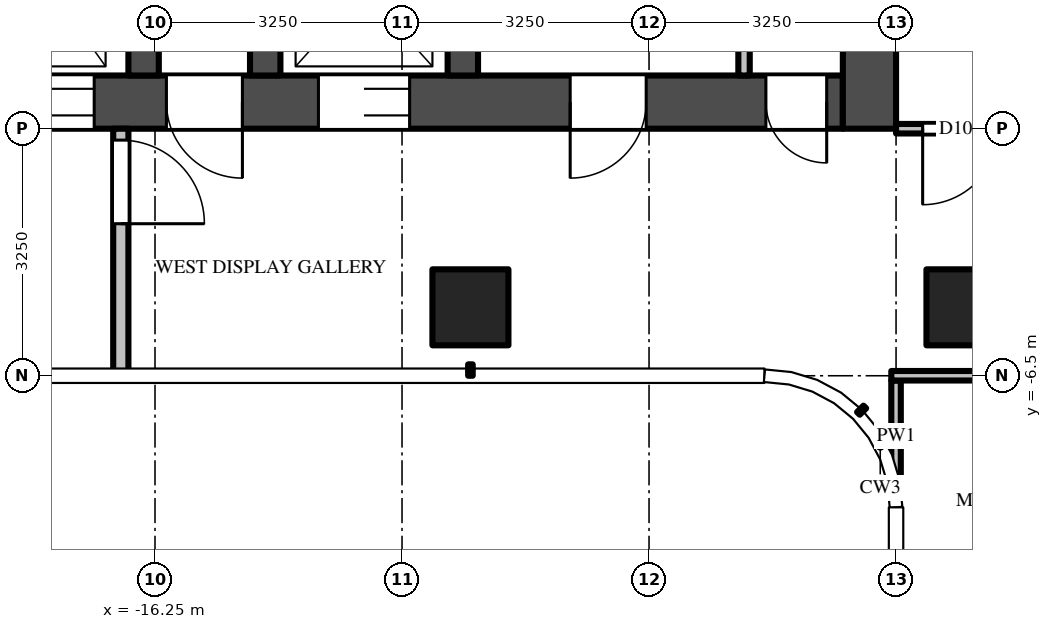
"""IFC4 building model, lengths in metres.
Left out: names, types, materials, properties, quantities, classifications, styles, units other than length and angle.
Written with IfcOpenShell. Run it as: python <this file> out.ifc"""

import sys

from ifc_helpers import new_model, si_unit, direction, frame, frame_2d, origin, origin_2d, place, context, subcontext, project, spatial, rectangle, extrude, source, transform, mapped, element, fill, save


model = new_model("IFC4")
c1 = context("Model", 3, precision=1e-05, world=origin(), true_north=direction((0.0, 1.0)))
c2 = subcontext(c1, "Body", "Model", "MODEL_VIEW")
j1 = project(units=[si_unit("LENGTHUNIT", "METRE"), si_unit("PLANEANGLEUNIT", "RADIAN")], contexts=[c1])
p1 = place(None, origin())
s1 = spatial("IfcSite", under=j1, at=p1, CompositionType="ELEMENT")
p2 = place(p1, origin())
s2 = spatial("IfcBuilding", under=s1, at=p2, CompositionType="ELEMENT")
p3 = place(p2, frame((0.0, 0.0, 279.4)))
s3 = spatial("IfcBuildingStorey", under=s2, at=p3, CompositionType="ELEMENT", Elevation=279.4)
m1 = source(origin(), c2, "Body", "SweptSolid", [
    extrude(rectangle(XDim=1.0, YDim=1.0, at=origin_2d()), origin(), (0.0, 0.0, 1.0), 3.9),
])
for number, where, z_axis, x_axis in (
    (1, (-5.6, -5.6, 0.0), (0.0, 0.0, 1.0), (1.0, 0.0, 0.0)),
    (2, (-12.1, -5.6, 0.0), (0.0, 0.0, 1.0), (1.0, 0.0, 0.0)),
):
    element("IfcColumn", number, at=place(p3, frame(where, z_axis=z_axis, x_axis=x_axis)), inside=s3, PredefinedType="COLUMN", context=c2, shape_type="MappedRepresentation", body=[
        mapped(m1, transform((0.0, 0.0, 0.0))),
    ])
m2 = source(origin(), c2, "Body", "SweptSolid", [
    extrude(rectangle(XDim=14.85, YDim=0.7, at=frame_2d((7.425, 0.0))), origin(), (0.0, 0.0, 1.0), 3.7),
])
p4 = place(p3, frame((-7.2, -2.9, 0.0), z_axis=(0.0, 0.0, 1.0), x_axis=(-1.0, 0.0, 0.0)))
e3 = element("IfcWall", 3, at=p4, inside=s3, PredefinedType="SHEAR", context=c2, shape_type="MappedRepresentation", body=[
    mapped(m2, transform((0.0, 0.0, 0.0))),
])
m3 = source(origin(), c2, "Body", "SweptSolid", [
    extrude(rectangle(XDim=1.2, YDim=2.1, at=frame_2d((0.6, 1.05))), frame((0.0, 0.36, 0.0), z_axis=(0.0, -1.0, 0.0), x_axis=(1.0, 0.0, 0.0)), (0.0, 0.0, 1.0), 0.72),
])
p5 = place(p4, frame((5.7, 0.0, 0.0)))
e4 = element("IfcOpeningElement", 4, at=p5, cuts=e3, PredefinedType="OPENING", context=c2, shape_type="MappedRepresentation", body=[
    mapped(m3, transform((0.0, 0.0, 0.0))),
])
m4 = source(origin(), c2, "Body", "SweptSolid", [
    extrude(rectangle(XDim=1.3, YDim=2.1, at=frame_2d((0.65, 1.05))), frame((0.0, 0.36, 0.0), z_axis=(0.0, -1.0, 0.0), x_axis=(1.0, 0.0, 0.0)), (0.0, 0.0, 1.0), 0.72),
])
p6 = place(p4, frame((12.2, 0.0, 0.0)))
e5 = element("IfcOpeningElement", 5, at=p6, cuts=e3, PredefinedType="OPENING", context=c2, shape_type="MappedRepresentation", body=[
    mapped(m4, transform((0.0, 0.0, 0.0))),
])
p7 = place(p4, frame((9.85, 0.0, 0.0)))
e6 = element("IfcOpeningElement", 6, at=p7, cuts=e3, PredefinedType="OPENING", context=c2, shape_type="MappedRepresentation", body=[
    mapped(m3, transform((0.0, 0.0, 0.0))),
])
m5 = source(origin(), c2, "Body", "SweptSolid", [
    extrude(rectangle(XDim=1.0, YDim=2.1, at=frame_2d((0.5, 1.05))), frame((0.0, 0.36, 0.0), z_axis=(0.0, -1.0, 0.0), x_axis=(1.0, 0.0, 0.0)), (0.0, 0.0, 1.0), 0.72),
])
p8 = place(p4, frame((7.9, 0.0, 0.0)))
e7 = element("IfcOpeningElement", 7, at=p8, cuts=e3, PredefinedType="OPENING", context=c2, shape_type="MappedRepresentation", body=[
    mapped(m5, transform((0.0, 0.0, 0.0))),
])
m6 = source(origin(), c2, "Body", "SweptSolid", [
    extrude(rectangle(XDim=0.8, YDim=2.1, at=frame_2d((0.4, 1.05))), frame((0.0, 0.36, 0.0), z_axis=(0.0, -1.0, 0.0), x_axis=(1.0, 0.0, 0.0)), (0.0, 0.0, 1.0), 0.72),
])
p9 = place(p4, frame((0.212, 0.0, 0.0)))
e8 = element("IfcOpeningElement", 8, at=p9, cuts=e3, PredefinedType="OPENING", context=c2, shape_type="MappedRepresentation", body=[
    mapped(m6, transform((0.0, 0.0, 0.0))),
])
p10 = place(p4, frame((2.587, 0.0, 0.0)))
e9 = element("IfcOpeningElement", 9, at=p10, cuts=e3, PredefinedType="OPENING", context=c2, shape_type="MappedRepresentation", body=[
    mapped(m5, transform((0.0, 0.0, 0.0))),
])
m7 = source(origin(), c2, "Body", "SweptSolid", [
    extrude(rectangle(XDim=9.05, YDim=0.7, at=frame_2d((4.525, 0.0))), origin(), (0.0, 0.0, 1.0), 3.7),
])
p11 = place(p3, frame((-6.85, 5.8, 0.0), z_axis=(0.0, 0.0, 1.0), x_axis=(0.0, -1.0, 0.0)))
e10 = element("IfcWall", 10, at=p11, inside=s3, PredefinedType="SHEAR", context=c2, shape_type="MappedRepresentation", body=[
    mapped(m7, transform((0.0, 0.0, 0.0))),
])
m8 = source(origin(), c2, "Body", "SweptSolid", [
    extrude(rectangle(XDim=1.8, YDim=2.1, at=frame_2d((0.9, 1.05))), frame((0.0, 0.36, 0.0), z_axis=(0.0, -1.0, 0.0), x_axis=(1.0, 0.0, 0.0)), (0.0, 0.0, 1.0), 0.72),
])
p12 = place(p11, frame((3.15, 0.0, 0.0)))
e11 = element("IfcOpeningElement", 11, at=p12, cuts=e10, PredefinedType="OPENING", context=c2, shape_type="MappedRepresentation", body=[
    mapped(m8, transform((0.0, 0.0, 0.0))),
])
m9 = source(origin(), c2, "Body", "SweptSolid", [
    extrude(rectangle(XDim=2.45, YDim=0.4, at=frame_2d((1.225, 0.0))), origin(), (0.0, 0.0, 1.0), 3.7),
])
for number, where, z_axis, x_axis in (
    (12, (-12.2, -0.1, 0.0), (0.0, 0.0, 1.0), (0.0, -1.0, 0.0)),
    (13, (-14.8, -0.1, 0.0), (0.0, 0.0, 1.0), (0.0, -1.0, 0.0)),
    (14, (-16.4, -0.1, 0.0), (0.0, 0.0, 1.0), (0.0, -1.0, 0.0)),
):
    element("IfcWall", number, at=place(p3, frame(where, z_axis=z_axis, x_axis=x_axis)), inside=s3, PredefinedType="SHEAR", context=c2, shape_type="MappedRepresentation", body=[
        mapped(m9, transform((0.0, 0.0, 0.0))),
    ])
m10 = source(origin(), c2, "Body", "SweptSolid", [
    extrude(rectangle(XDim=3.25, YDim=0.2, at=frame_2d((1.625, 0.0))), origin(), (0.0, 0.0, 1.0), 3.7),
])
p13 = place(p3, frame((-16.7, -3.25, 0.0), z_axis=(0.0, 0.0, 1.0), x_axis=(0.0, -1.0, 0.0)))
e15 = element("IfcWall", 15, at=p13, inside=s3, PredefinedType="PARTITIONING", context=c2, shape_type="MappedRepresentation", body=[
    mapped(m10, transform((0.0, 0.0, 0.0))),
])
m11 = source(origin(), c2, "Body", "SweptSolid", [
    extrude(rectangle(XDim=1.1, YDim=2.1, at=frame_2d((0.55, 1.05))), frame((0.0, 0.11, 0.0), z_axis=(0.0, -1.0, 0.0), x_axis=(1.0, 0.0, 0.0)), (0.0, 0.0, 1.0), 0.22),
])
p14 = place(p13, frame((0.15, 0.0, 0.0)))
e16 = element("IfcOpeningElement", 16, at=p14, cuts=e15, PredefinedType="OPENING", context=c2, shape_type="MappedRepresentation", body=[
    mapped(m11, transform((0.0, 0.0, 0.0))),
])
m12 = source(origin(), c2, "Body", "SweptSolid", [
    extrude(rectangle(XDim=2.45, YDim=0.15, at=frame_2d((1.225, 0.0))), origin(), (0.0, 0.0, 1.0), 3.7),
])
p15 = place(p3, frame((-8.5, -0.1, 0.0), z_axis=(0.0, 0.0, 1.0), x_axis=(0.0, -1.0, 0.0)))
e17 = element("IfcWall", 17, at=p15, inside=s3, PredefinedType="PARTITIONING", context=c2, shape_type="MappedRepresentation", body=[
    mapped(m12, transform((0.0, 0.0, 0.0))),
])
m13 = source(origin(), c2, "Body", "SweptSolid", [
    extrude(rectangle(XDim=1.469, YDim=0.125, at=frame_2d((0.734, 0.0))), origin(), (0.0, 0.0, 1.0), 3.7),
])
p16 = place(p3, frame((-6.5, -6.562, 0.0), z_axis=(0.0, 0.0, 1.0), x_axis=(0.0, -1.0, 0.0)))
e18 = element("IfcWall", 18, at=p16, inside=s3, PredefinedType="PARTITIONING", context=c2, shape_type="MappedRepresentation", body=[
    mapped(m13, transform((0.0, 0.0, 0.0))),
])
m14 = source(origin(), c2, "Body", "SweptSolid", [
    extrude(rectangle(XDim=3.725, YDim=0.125, at=frame_2d((1.863, 0.0))), origin(), (0.0, 0.0, 1.0), 2.78),
])
p17 = place(p3, frame((-2.837, -6.5, 0.0), z_axis=(0.0, 0.0, 1.0), x_axis=(-1.0, 0.0, 0.0)))
e19 = element("IfcWall", 19, at=p17, inside=s3, PredefinedType="PARTITIONING", context=c2, shape_type="MappedRepresentation", body=[
    mapped(m14, transform((0.0, 0.0, 0.0))),
])
m15 = source(origin(), c2, "Body", "SweptSolid", [
    extrude(rectangle(XDim=1.0, YDim=2.1, at=frame_2d((0.5, 1.05))), frame((0.0, 0.073, 0.0), z_axis=(0.0, -1.0, 0.0), x_axis=(1.0, 0.0, 0.0)), (0.0, 0.0, 1.0), 0.145),
])
p18 = place(p17, frame((1.212, 0.0, 0.0)))
e20 = element("IfcOpeningElement", 20, at=p18, cuts=e19, PredefinedType="OPENING", context=c2, shape_type="MappedRepresentation", body=[
    mapped(m15, transform((0.0, 0.0, 0.0))),
])
m16 = source(origin(), c2, "Body", "SweptSolid", [
    extrude(rectangle(XDim=5.363, YDim=0.125, at=frame_2d((2.681, 0.0))), origin(), (0.0, 0.0, 1.0), 2.997),
])
p19 = place(p3, frame((-1.137, -3.25, 0.0), z_axis=(0.0, 0.0, 1.0), x_axis=(-1.0, 0.0, 0.0)))
e21 = element("IfcWall", 21, at=p19, inside=s3, PredefinedType="PARTITIONING", context=c2, shape_type="MappedRepresentation", body=[
    mapped(m16, transform((0.0, 0.0, 0.0))),
])
p20 = place(p19, frame((4.012, 0.0, 0.0)))
e22 = element("IfcOpeningElement", 22, at=p20, cuts=e21, PredefinedType="OPENING", context=c2, shape_type="MappedRepresentation", body=[
    mapped(m15, transform((0.0, 0.0, 0.0))),
])
m17 = source(origin(), c2, "Body", "SweptSolid", [
    extrude(rectangle(XDim=1.2, YDim=2.1, at=frame_2d((0.6, 1.05))), frame((0.0, -0.275, 0.0), z_axis=(0.0, -1.0, 0.0), x_axis=(1.0, 0.0, 0.0)), (0.0, 0.0, 1.0), 0.05),
])
p21 = place(p5, origin())
e23 = element("IfcDoor", 23, at=p21, inside=s3, OperationType="DOUBLE_DOOR_SLIDING", PredefinedType="DOOR", context=c2, shape_type="MappedRepresentation", body=[
    mapped(m17, transform((0.0, 0.0, 0.0))),
])
fill(e4, e23)
p22 = place(p7, origin())
e24 = element("IfcDoor", 24, at=p22, inside=s3, OperationType="DOUBLE_DOOR_SLIDING", PredefinedType="DOOR", context=c2, shape_type="MappedRepresentation", body=[
    mapped(m17, transform((0.0, 0.0, 0.0))),
])
fill(e6, e24)
m18 = source(origin(), c2, "Body", "SweptSolid", [
    extrude(rectangle(XDim=1.0, YDim=2.1, at=frame_2d((0.5, 1.05))), frame((0.0, -0.275, 0.0), z_axis=(0.0, -1.0, 0.0), x_axis=(1.0, 0.0, 0.0)), (0.0, 0.0, 1.0), 0.05),
])
p23 = place(p8, origin())
e25 = element("IfcDoor", 25, at=p23, inside=s3, OperationType="SINGLE_SWING_LEFT", PredefinedType="DOOR", context=c2, shape_type="MappedRepresentation", body=[
    mapped(m18, transform((0.0, 0.0, 0.0))),
])
fill(e7, e25)
m19 = source(origin(), c2, "Body", "SweptSolid", [
    extrude(rectangle(XDim=1.1, YDim=2.1, at=frame_2d((0.55, 1.05))), frame((0.0, 0.025, 0.0), z_axis=(0.0, -1.0, 0.0), x_axis=(1.0, 0.0, 0.0)), (0.0, 0.0, 1.0), 0.05),
])
p24 = place(p14, origin())
e26 = element("IfcDoor", 26, at=p24, inside=s3, OperationType="SINGLE_SWING_RIGHT", PredefinedType="DOOR", context=c2, shape_type="MappedRepresentation", body=[
    mapped(m19, transform((0.0, 0.0, 0.0))),
])
fill(e16, e26)
m20 = source(origin(), c2, "Body", "SweptSolid", [
    extrude(rectangle(XDim=0.8, YDim=2.1, at=frame_2d((0.4, 1.05))), frame((0.0, -0.275, 0.0), z_axis=(0.0, -1.0, 0.0), x_axis=(1.0, 0.0, 0.0)), (0.0, 0.0, 1.0), 0.05),
])
p25 = place(p9, origin())
e27 = element("IfcDoor", 27, at=p25, inside=s3, OperationType="SINGLE_SWING_LEFT", PredefinedType="DOOR", context=c2, shape_type="MappedRepresentation", body=[
    mapped(m20, transform((0.0, 0.0, 0.0))),
])
fill(e8, e27)
p26 = place(p10, origin())
e28 = element("IfcDoor", 28, at=p26, inside=s3, OperationType="SINGLE_SWING_RIGHT", PredefinedType="DOOR", context=c2, shape_type="MappedRepresentation", body=[
    mapped(m18, transform((0.0, 0.0, 0.0))),
])
fill(e9, e28)
m21 = source(origin(), c2, "Body", "SweptSolid", [
    extrude(rectangle(XDim=1.0, YDim=2.1, at=frame_2d((0.5, 1.05))), frame((0.0, 0.025, 0.0), z_axis=(0.0, -1.0, 0.0), x_axis=(1.0, 0.0, 0.0)), (0.0, 0.0, 1.0), 0.05),
])
p27 = place(p20, origin())
e29 = element("IfcDoor", 29, at=p27, inside=s3, OperationType="SINGLE_SWING_RIGHT", PredefinedType="DOOR", context=c2, shape_type="MappedRepresentation", body=[
    mapped(m21, transform((0.0, 0.0, 0.0))),
])
fill(e22, e29)
save(model, sys.argv[1])
